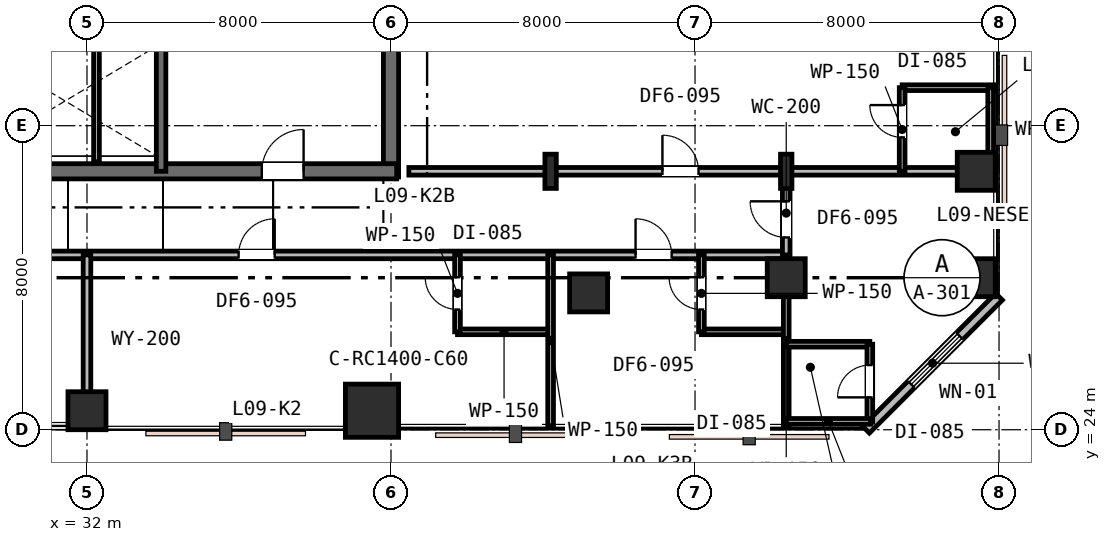
"""IFC4 building model, lengths in metres.
Left out: names, types, materials, properties, quantities, classifications, styles, units other than length and angle.
Written with IfcOpenShell. Run it as: python <this file> out.ifc"""

import sys

from ifc_helpers import new_model, si_unit, direction, frame, frame_2d, origin, origin_2d, place, context, subcontext, project, spatial, rectangle, i_section, extrude, element, fill, save


model = new_model("IFC4")
c1 = context("Model", 3, precision=1e-05, world=origin(), true_north=direction((0.0, 1.0)))
c2 = subcontext(c1, "Body", "Model", "MODEL_VIEW")
j1 = project(units=[si_unit("LENGTHUNIT", "METRE"), si_unit("PLANEANGLEUNIT", "RADIAN")], contexts=[c1])
p1 = place(None, origin())
s1 = spatial("IfcSite", under=j1, at=p1, CompositionType="ELEMENT")
p2 = place(p1, origin())
s2 = spatial("IfcBuilding", under=s1, at=p2, CompositionType="ELEMENT")
p3 = place(p2, frame((0.0, 0.0, 40.2)))
s3 = spatial("IfcBuildingStorey", under=s2, at=p3, CompositionType="ELEMENT", Elevation=40.2)
p4 = place(p3, frame((40.0, 30.65, 0.0), z_axis=(0.0, 0.0, 1.0), x_axis=(0.0, 1.0, 0.0)))
e1 = element("IfcWall", 1, at=p4, inside=s3, PredefinedType="SHEAR", context=c2, shape_type="SweptSolid", body=[
    extrude(rectangle(XDim=12.3, YDim=0.4, at=frame_2d((6.15, 0.0))), origin(), (0.0, 0.0, 1.0), 3.6),
])
p5 = place(p3, frame((28.95, 30.8, 0.0), z_axis=(0.0, 0.0, 1.0), x_axis=(1.0, 0.0, 0.0)))
e2 = element("IfcWall", 2, at=p5, inside=s3, PredefinedType="SHEAR", context=c2, shape_type="SweptSolid", body=[
    extrude(rectangle(XDim=11.2, YDim=0.4, at=frame_2d((5.6, 0.0))), origin(), (0.0, 0.0, 1.0), 3.6),
])
p6 = place(p5, frame((7.65, 0.0, 0.0)))
e3 = element("IfcOpeningElement", 3, at=p6, cuts=e2, PredefinedType="OPENING", context=c2, shape_type="SweptSolid", body=[
    extrude(rectangle(XDim=1.1, YDim=2.15, at=frame_2d((0.55, 1.075))), frame((0.0, 0.21, 0.0), z_axis=(0.0, -1.0, 0.0), x_axis=(1.0, 0.0, 0.0)), (0.0, 0.0, 1.0), 0.42),
])
p7 = place(p3, frame((33.95, 30.8, 0.0), z_axis=(0.0, 0.0, 1.0), x_axis=(0.0, 1.0, 0.0)))
e4 = element("IfcWall", 4, at=p7, inside=s3, PredefinedType="SHEAR", context=c2, shape_type="SweptSolid", body=[
    extrude(rectangle(XDim=6.45, YDim=0.25, at=frame_2d((3.225, 0.0))), origin(), (0.0, 0.0, 1.0), 3.6),
])
p8 = place(p3, frame((32.0, 24.5, 0.0), z_axis=(0.0, 0.0, 1.0), x_axis=(1.0, 0.0, 0.0)))
e5 = element("IfcColumn", 5, at=p8, inside=s3, PredefinedType="COLUMN", context=c2, shape_type="SweptSolid", body=[
    extrude(rectangle(XDim=1.0, YDim=1.0, at=origin_2d()), origin(), (0.0, 0.0, 1.0), 3.6),
])
p9 = place(p3, frame((39.5, 24.5, 0.0), z_axis=(0.0, 0.0, 1.0), x_axis=(1.0, 0.0, 0.0)))
e6 = element("IfcColumn", 6, at=p9, inside=s3, PredefinedType="COLUMN", context=c2, shape_type="SweptSolid", body=[
    extrude(rectangle(XDim=1.4, YDim=1.4, at=origin_2d()), origin(), (0.0, 0.0, 1.0), 3.6),
])
for number, where, z_axis, x_axis in (
    (7, (45.2, 27.6, 0.0), (0.0, 0.0, 1.0), (1.0, 0.0, 0.0)),
    (8, (50.4, 28.0, 0.0), (0.0, 0.0, 1.0), (1.0, 0.0, 0.0)),
    (9, (55.4, 28.0, 0.0), (0.0, 0.0, 1.0), (1.0, 0.0, 0.0)),
    (10, (55.4, 30.8, 0.0), (0.0, 0.0, 1.0), (1.0, 0.0, 0.0)),
):
    element("IfcColumn", number, at=place(p3, frame(where, z_axis=z_axis, x_axis=x_axis)), inside=s3, PredefinedType="COLUMN", context=c2, shape_type="SweptSolid", body=[
        extrude(rectangle(XDim=1.0, YDim=1.0, at=origin_2d()), origin(), (0.0, 0.0, 1.0), 3.6),
    ])
for number, where, z_axis, x_axis in (
    (11, (44.2, 30.8, 0.0), (0.0, 0.0, 1.0), (1.0, 0.0, 0.0)),
    (12, (50.4, 30.8, 0.0), (0.0, 0.0, 1.0), (1.0, 0.0, 0.0)),
):
    element("IfcColumn", number, at=place(p3, frame(where, z_axis=z_axis, x_axis=x_axis)), inside=s3, PredefinedType="COLUMN", context=c2, shape_type="SweptSolid", body=[
        extrude(i_section(OverallWidth=0.3, OverallDepth=0.9, WebThickness=0.018, FlangeThickness=0.035, FilletRadius=0.03, at=origin_2d()), origin(), (0.0, 0.0, 1.0), 3.6),
    ])
p10 = place(p3, frame((52.5, 24.0, 0.0), z_axis=(0.0, 0.0, 1.0), x_axis=(0.707106781187, 0.707106781187, 0.0)))
e13 = element("IfcWall", 13, at=p10, inside=s3, PredefinedType="STANDARD", context=c2, shape_type="SweptSolid", body=[
    extrude(rectangle(XDim=4.95, YDim=0.25, at=frame_2d((2.475, 0.0))), origin(), (0.0, 0.0, 1.0), 3.33),
])
p11 = place(p10, frame((1.685, 0.0, 0.75)))
e14 = element("IfcOpeningElement", 14, at=p11, cuts=e13, PredefinedType="OPENING", context=c2, shape_type="SweptSolid", body=[
    extrude(rectangle(XDim=1.8, YDim=1.85, at=frame_2d((0.9, 0.925))), frame((0.0, 0.135, 0.0), z_axis=(0.0, -1.0, 0.0), x_axis=(1.0, 0.0, 0.0)), (0.0, 0.0, 1.0), 0.27),
])
p12 = place(p3, frame((32.25, 31.05, 0.0), z_axis=(0.0, 0.0, 1.0), x_axis=(0.0, 1.0, 0.0)))
e15 = element("IfcWall", 15, at=p12, inside=s3, PredefinedType="PLUMBINGWALL", context=c2, shape_type="SweptSolid", body=[
    extrude(rectangle(XDim=3.1, YDim=0.15, at=frame_2d((1.55, 0.0))), origin(), (0.0, 0.0, 1.0), 3.33),
])
p13 = place(p3, frame((19.6, 28.6, 0.0), z_axis=(0.0, 0.0, 1.0), x_axis=(1.0, 0.0, 0.0)))
e16 = element("IfcWall", 16, at=p13, inside=s3, PredefinedType="PARTITIONING", context=c2, shape_type="SweptSolid", body=[
    extrude(rectangle(XDim=30.8, YDim=0.2, at=frame_2d((15.4, 0.0))), origin(), (0.0, 0.0, 1.0), 2.82),
])
p14 = place(p13, frame((7.925, 0.0, 0.0)))
e17 = element("IfcOpeningElement", 17, at=p14, cuts=e16, PredefinedType="OPENING", context=c2, shape_type="SweptSolid", body=[
    extrude(rectangle(XDim=0.95, YDim=2.15, at=frame_2d((0.475, 1.075))), frame((0.0, 0.11, 0.0), z_axis=(0.0, -1.0, 0.0), x_axis=(1.0, 0.0, 0.0)), (0.0, 0.0, 1.0), 0.22),
])
p15 = place(p13, frame((16.39, 0.0, 0.0)))
e18 = element("IfcOpeningElement", 18, at=p15, cuts=e16, PredefinedType="OPENING", context=c2, shape_type="SweptSolid", body=[
    extrude(rectangle(XDim=0.95, YDim=2.15, at=frame_2d((0.475, 1.075))), frame((0.0, 0.11, 0.0), z_axis=(0.0, -1.0, 0.0), x_axis=(1.0, 0.0, 0.0)), (0.0, 0.0, 1.0), 0.22),
])
p16 = place(p13, frame((26.835, 0.0, 0.0)))
e19 = element("IfcOpeningElement", 19, at=p16, cuts=e16, PredefinedType="OPENING", context=c2, shape_type="SweptSolid", body=[
    extrude(rectangle(XDim=0.95, YDim=2.15, at=frame_2d((0.475, 1.075))), frame((0.0, 0.11, 0.0), z_axis=(0.0, -1.0, 0.0), x_axis=(1.0, 0.0, 0.0)), (0.0, 0.0, 1.0), 0.22),
])
p17 = place(p3, frame((32.0, 24.1, 0.0), z_axis=(0.0, 0.0, 1.0), x_axis=(0.0, 1.0, 0.0)))
e20 = element("IfcWall", 20, at=p17, inside=s3, PredefinedType="PARTITIONING", context=c2, shape_type="SweptSolid", body=[
    extrude(rectangle(XDim=4.5, YDim=0.2, at=frame_2d((2.25, 0.0))), origin(), (0.0, 0.0, 1.0), 2.93),
])
p18 = place(p3, frame((41.75, 26.576, 0.0), z_axis=(0.0, 0.0, 1.0), x_axis=(1.0, 0.0, 0.0)))
e21 = element("IfcWall", 21, at=p18, inside=s3, PredefinedType="PARTITIONING", context=c2, shape_type="SweptSolid", body=[
    extrude(rectangle(XDim=2.45, YDim=0.15, at=frame_2d((1.225, 0.0))), origin(), (0.0, 0.0, 1.0), 3.33),
])
p19 = place(p3, frame((41.75, 26.576, 0.0), z_axis=(0.0, 0.0, 1.0), x_axis=(0.0, 1.0, 0.0)))
e22 = element("IfcWall", 22, at=p19, inside=s3, PredefinedType="PARTITIONING", context=c2, shape_type="SweptSolid", body=[
    extrude(rectangle(XDim=2.024, YDim=0.15, at=frame_2d((1.012, 0.0))), origin(), (0.0, 0.0, 1.0), 3.33),
])
p20 = place(p19, frame((0.587, 0.0, 0.0)))
e23 = element("IfcOpeningElement", 23, at=p20, cuts=e22, PredefinedType="OPENING", context=c2, shape_type="SweptSolid", body=[
    extrude(rectangle(XDim=0.85, YDim=2.15, at=frame_2d((0.425, 1.075))), frame((0.0, 0.085, 0.0), z_axis=(0.0, -1.0, 0.0), x_axis=(1.0, 0.0, 0.0)), (0.0, 0.0, 1.0), 0.17),
])
p21 = place(p3, frame((44.2, 28.6, 0.0), z_axis=(0.0, 0.0, 1.0), x_axis=(0.0, -1.0, 0.0)))
e24 = element("IfcWall", 24, at=p21, inside=s3, PredefinedType="PARTITIONING", context=c2, shape_type="SweptSolid", body=[
    extrude(rectangle(XDim=4.5, YDim=0.15, at=frame_2d((2.25, 0.0))), origin(), (0.0, 0.0, 1.0), 3.33),
])
p22 = place(p3, frame((48.168, 26.576, 0.0), z_axis=(0.0, 0.0, 1.0), x_axis=(1.0, 0.0, 0.0)))
e25 = element("IfcWall", 25, at=p22, inside=s3, PredefinedType="PARTITIONING", context=c2, shape_type="SweptSolid", body=[
    extrude(rectangle(XDim=2.232, YDim=0.15, at=frame_2d((1.116, 0.0))), origin(), (0.0, 0.0, 1.0), 3.33),
])
p23 = place(p3, frame((48.168, 26.576, 0.0), z_axis=(0.0, 0.0, 1.0), x_axis=(0.0, 1.0, 0.0)))
e26 = element("IfcWall", 26, at=p23, inside=s3, PredefinedType="PARTITIONING", context=c2, shape_type="SweptSolid", body=[
    extrude(rectangle(XDim=2.024, YDim=0.15, at=frame_2d((1.012, 0.0))), origin(), (0.0, 0.0, 1.0), 3.33),
])
p24 = place(p23, frame((0.587, 0.0, 0.0)))
e27 = element("IfcOpeningElement", 27, at=p24, cuts=e26, PredefinedType="OPENING", context=c2, shape_type="SweptSolid", body=[
    extrude(rectangle(XDim=0.85, YDim=2.15, at=frame_2d((0.425, 1.075))), frame((0.0, 0.085, 0.0), z_axis=(0.0, -1.0, 0.0), x_axis=(1.0, 0.0, 0.0)), (0.0, 0.0, 1.0), 0.17),
])
p25 = place(p3, frame((50.4, 28.6, 0.0), z_axis=(0.0, 0.0, 1.0), x_axis=(0.0, -1.0, 0.0)))
e28 = element("IfcWall", 28, at=p25, inside=s3, PredefinedType="PARTITIONING", context=c2, shape_type="SweptSolid", body=[
    extrude(rectangle(XDim=4.5, YDim=0.15, at=frame_2d((2.25, 0.0))), origin(), (0.0, 0.0, 1.0), 2.82),
])
p26 = place(p3, frame((40.47, 30.8, 0.0), z_axis=(0.0, 0.0, 1.0), x_axis=(1.0, 0.0, 0.0)))
e29 = element("IfcWall", 29, at=p26, inside=s3, PredefinedType="PARTITIONING", context=c2, shape_type="SweptSolid", body=[
    extrude(rectangle(XDim=15.43, YDim=0.2, at=frame_2d((7.715, 0.0))), origin(), (0.0, 0.0, 1.0), 2.82),
])
p27 = place(p26, frame((6.673, 0.0, 0.0)))
e30 = element("IfcOpeningElement", 30, at=p27, cuts=e29, PredefinedType="OPENING", context=c2, shape_type="SweptSolid", body=[
    extrude(rectangle(XDim=0.95, YDim=2.15, at=frame_2d((0.475, 1.075))), frame((0.0, 0.11, 0.0), z_axis=(0.0, -1.0, 0.0), x_axis=(1.0, 0.0, 0.0)), (0.0, 0.0, 1.0), 0.22),
])
p28 = place(p3, frame((53.45, 33.0, 0.0), z_axis=(0.0, 0.0, 1.0), x_axis=(1.0, 0.0, 0.0)))
e31 = element("IfcWall", 31, at=p28, inside=s3, PredefinedType="PARTITIONING", context=c2, shape_type="SweptSolid", body=[
    extrude(rectangle(XDim=2.45, YDim=0.15, at=frame_2d((1.225, 0.0))), origin(), (0.0, 0.0, 1.0), 2.93),
])
p29 = place(p3, frame((53.45, 30.8, 0.0), z_axis=(0.0, 0.0, 1.0), x_axis=(0.0, 1.0, 0.0)))
e32 = element("IfcWall", 32, at=p29, inside=s3, PredefinedType="PARTITIONING", context=c2, shape_type="SweptSolid", body=[
    extrude(rectangle(XDim=2.2, YDim=0.15, at=frame_2d((1.1, 0.0))), origin(), (0.0, 0.0, 1.0), 2.82),
])
p30 = place(p29, frame((0.892, 0.0, 0.0)))
e33 = element("IfcOpeningElement", 33, at=p30, cuts=e32, PredefinedType="OPENING", context=c2, shape_type="SweptSolid", body=[
    extrude(rectangle(XDim=0.85, YDim=2.15, at=frame_2d((0.425, 1.075))), frame((0.0, 0.085, 0.0), z_axis=(0.0, -1.0, 0.0), x_axis=(1.0, 0.0, 0.0)), (0.0, 0.0, 1.0), 0.17),
])
p31 = place(p3, frame((55.78, 33.0, 0.0), z_axis=(0.0, 0.0, 1.0), x_axis=(0.0, -1.0, 0.0)))
e34 = element("IfcWall", 34, at=p31, inside=s3, PredefinedType="PARTITIONING", context=c2, shape_type="SweptSolid", body=[
    extrude(rectangle(XDim=2.2, YDim=0.15, at=frame_2d((1.1, 0.0))), origin(), (0.0, 0.0, 1.0), 2.82),
])
p32 = place(p3, frame((50.4, 28.6, 0.0), z_axis=(0.0, 0.0, 1.0), x_axis=(0.0, 1.0, 0.0)))
e35 = element("IfcWall", 35, at=p32, inside=s3, PredefinedType="PARTITIONING", context=c2, shape_type="SweptSolid", body=[
    extrude(rectangle(XDim=2.2, YDim=0.2, at=frame_2d((1.1, 0.0))), origin(), (0.0, 0.0, 1.0), 2.82),
])
p33 = place(p32, frame((0.46, 0.0, 0.0)))
e36 = element("IfcOpeningElement", 36, at=p33, cuts=e35, PredefinedType="OPENING", context=c2, shape_type="SweptSolid", body=[
    extrude(rectangle(XDim=0.95, YDim=2.15, at=frame_2d((0.475, 1.075))), frame((0.0, 0.11, 0.0), z_axis=(0.0, -1.0, 0.0), x_axis=(1.0, 0.0, 0.0)), (0.0, 0.0, 1.0), 0.22),
])
p34 = place(p3, frame((50.4, 26.25, 0.0), z_axis=(0.0, 0.0, 1.0), x_axis=(1.0, 0.0, 0.0)))
e37 = element("IfcWall", 37, at=p34, inside=s3, PredefinedType="PARTITIONING", context=c2, shape_type="SweptSolid", body=[
    extrude(rectangle(XDim=2.2, YDim=0.15, at=frame_2d((1.1, 0.0))), origin(), (0.0, 0.0, 1.0), 3.33),
])
p35 = place(p3, frame((52.6, 24.2, 0.0), z_axis=(0.0, 0.0, 1.0), x_axis=(0.0, 1.0, 0.0)))
e38 = element("IfcWall", 38, at=p35, inside=s3, PredefinedType="PARTITIONING", context=c2, shape_type="SweptSolid", body=[
    extrude(rectangle(XDim=2.05, YDim=0.15, at=frame_2d((1.025, 0.0))), origin(), (0.0, 0.0, 1.0), 3.33),
])
p36 = place(p35, frame((0.651, 0.0, 0.0)))
e39 = element("IfcOpeningElement", 39, at=p36, cuts=e38, PredefinedType="OPENING", context=c2, shape_type="SweptSolid", body=[
    extrude(rectangle(XDim=0.85, YDim=2.15, at=frame_2d((0.425, 1.075))), frame((0.0, 0.085, 0.0), z_axis=(0.0, -1.0, 0.0), x_axis=(1.0, 0.0, 0.0)), (0.0, 0.0, 1.0), 0.17),
])
p37 = place(p3, frame((52.62, 24.22, 0.0), z_axis=(0.0, 0.0, 1.0), x_axis=(-1.0, 0.0, 0.0)))
e40 = element("IfcWall", 40, at=p37, inside=s3, PredefinedType="PARTITIONING", context=c2, shape_type="SweptSolid", body=[
    extrude(rectangle(XDim=2.22, YDim=0.15, at=frame_2d((1.11, 0.0))), origin(), (0.0, 0.0, 1.0), 3.33),
])
p38 = place(p11, origin())
e41 = element("IfcWindow", 41, at=p38, inside=s3, PartitioningType="SINGLE_PANEL", PredefinedType="WINDOW", context=c2, shape_type="SweptSolid", body=[
    extrude(rectangle(XDim=1.8, YDim=1.85, at=frame_2d((0.9, 0.925))), frame((0.0, 0.03, 0.0), z_axis=(0.0, -1.0, 0.0), x_axis=(1.0, 0.0, 0.0)), (0.0, 0.0, 1.0), 0.06),
])
fill(e14, e41)
p39 = place(p6, origin())
e42 = element("IfcDoor", 42, at=p39, inside=s3, OperationType="SINGLE_SWING_RIGHT", PredefinedType="DOOR", context=c2, shape_type="SweptSolid", body=[
    extrude(rectangle(XDim=1.1, YDim=2.15, at=frame_2d((0.55, 1.075))), frame((0.0, 0.025, 0.0), z_axis=(0.0, -1.0, 0.0), x_axis=(1.0, 0.0, 0.0)), (0.0, 0.0, 1.0), 0.05),
])
fill(e3, e42)
p40 = place(p15, origin())
e43 = element("IfcDoor", 43, at=p40, inside=s3, OperationType="SINGLE_SWING_RIGHT", PredefinedType="DOOR", context=c2, shape_type="SweptSolid", body=[
    extrude(rectangle(XDim=0.95, YDim=2.15, at=frame_2d((0.475, 1.075))), frame((0.0, 0.025, 0.0), z_axis=(0.0, -1.0, 0.0), x_axis=(1.0, 0.0, 0.0)), (0.0, 0.0, 1.0), 0.05),
])
fill(e18, e43)
p41 = place(p20, origin())
e44 = element("IfcDoor", 44, at=p41, inside=s3, OperationType="SINGLE_SWING_RIGHT", PredefinedType="DOOR", context=c2, shape_type="SweptSolid", body=[
    extrude(rectangle(XDim=0.85, YDim=2.15, at=frame_2d((0.425, 1.075))), frame((0.0, 0.025, 0.0), z_axis=(0.0, -1.0, 0.0), x_axis=(1.0, 0.0, 0.0)), (0.0, 0.0, 1.0), 0.05),
])
fill(e23, e44)
p42 = place(p16, origin())
e45 = element("IfcDoor", 45, at=p42, inside=s3, OperationType="SINGLE_SWING_LEFT", PredefinedType="DOOR", context=c2, shape_type="SweptSolid", body=[
    extrude(rectangle(XDim=0.95, YDim=2.15, at=frame_2d((0.475, 1.075))), frame((0.0, 0.025, 0.0), z_axis=(0.0, -1.0, 0.0), x_axis=(1.0, 0.0, 0.0)), (0.0, 0.0, 1.0), 0.05),
])
fill(e19, e45)
p43 = place(p24, origin())
e46 = element("IfcDoor", 46, at=p43, inside=s3, OperationType="SINGLE_SWING_RIGHT", PredefinedType="DOOR", context=c2, shape_type="SweptSolid", body=[
    extrude(rectangle(XDim=0.85, YDim=2.15, at=frame_2d((0.425, 1.075))), frame((0.0, 0.025, 0.0), z_axis=(0.0, -1.0, 0.0), x_axis=(1.0, 0.0, 0.0)), (0.0, 0.0, 1.0), 0.05),
])
fill(e27, e46)
p44 = place(p27, origin())
e47 = element("IfcDoor", 47, at=p44, inside=s3, OperationType="SINGLE_SWING_LEFT", PredefinedType="DOOR", context=c2, shape_type="SweptSolid", body=[
    extrude(rectangle(XDim=0.95, YDim=2.15, at=frame_2d((0.475, 1.075))), frame((0.0, 0.025, 0.0), z_axis=(0.0, -1.0, 0.0), x_axis=(1.0, 0.0, 0.0)), (0.0, 0.0, 1.0), 0.05),
])
fill(e30, e47)
p45 = place(p30, origin())
e48 = element("IfcDoor", 48, at=p45, inside=s3, OperationType="SINGLE_SWING_RIGHT", PredefinedType="DOOR", context=c2, shape_type="SweptSolid", body=[
    extrude(rectangle(XDim=0.85, YDim=2.15, at=frame_2d((0.425, 1.075))), frame((0.0, 0.025, 0.0), z_axis=(0.0, -1.0, 0.0), x_axis=(1.0, 0.0, 0.0)), (0.0, 0.0, 1.0), 0.05),
])
fill(e33, e48)
p46 = place(p33, origin())
e49 = element("IfcDoor", 49, at=p46, inside=s3, OperationType="SINGLE_SWING_RIGHT", PredefinedType="DOOR", context=c2, shape_type="SweptSolid", body=[
    extrude(rectangle(XDim=0.95, YDim=2.15, at=frame_2d((0.475, 1.075))), frame((0.0, 0.025, 0.0), z_axis=(0.0, -1.0, 0.0), x_axis=(1.0, 0.0, 0.0)), (0.0, 0.0, 1.0), 0.05),
])
fill(e36, e49)
p47 = place(p36, origin())
e50 = element("IfcDoor", 50, at=p47, inside=s3, OperationType="SINGLE_SWING_LEFT", PredefinedType="DOOR", context=c2, shape_type="SweptSolid", body=[
    extrude(rectangle(XDim=0.85, YDim=2.15, at=frame_2d((0.425, 1.075))), frame((0.0, 0.025, 0.0), z_axis=(0.0, -1.0, 0.0), x_axis=(1.0, 0.0, 0.0)), (0.0, 0.0, 1.0), 0.05),
])
fill(e39, e50)
save(model, sys.argv[1])
